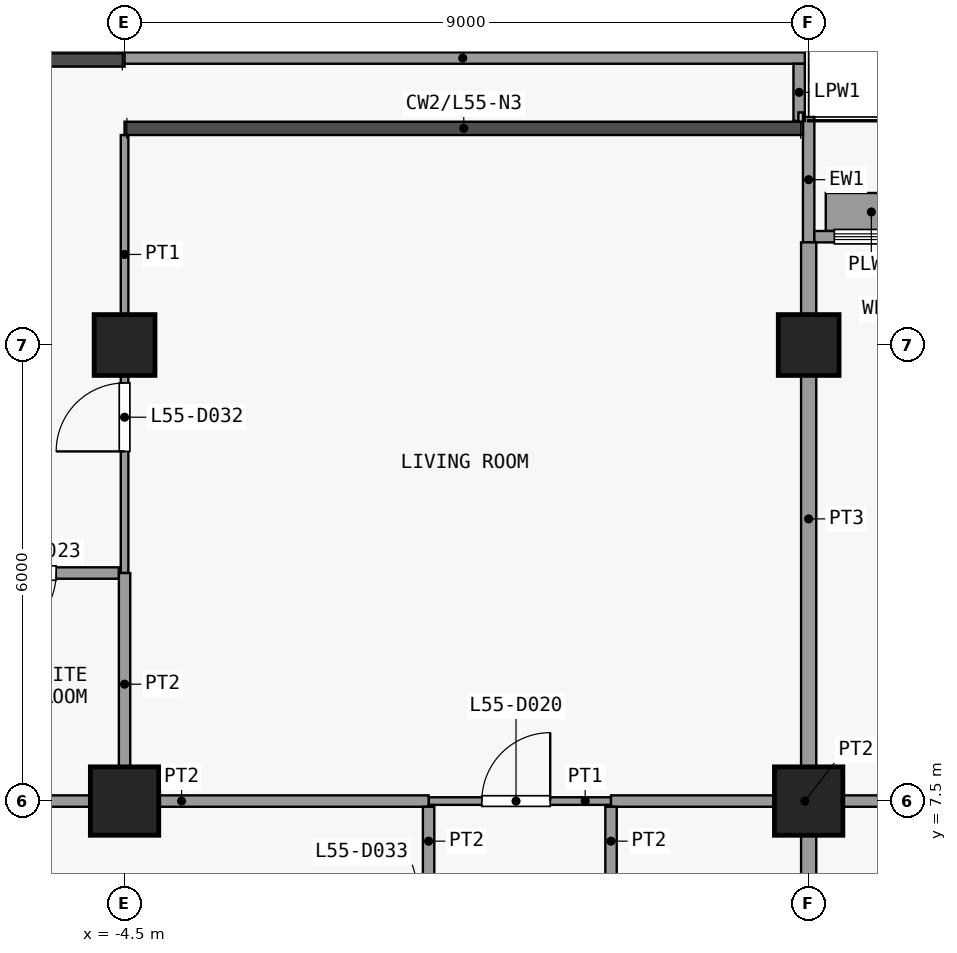
"""IFC4 building model, lengths in metres.
Left out: names, types, materials, properties, quantities, classifications, styles, units other than length and angle.
Written with IfcOpenShell. Run it as: python <this file> out.ifc"""

import sys

from ifc_helpers import new_model, si_unit, direction, frame, frame_2d, origin, origin_2d, place, context, subcontext, project, spatial, rectangle, extrude, element, fill, save


model = new_model("IFC4")
c1 = context("Model", 3, precision=1e-05, world=origin(), true_north=direction((0.0, 1.0)))
c2 = subcontext(c1, "Body", "Model", "MODEL_VIEW")
j1 = project(units=[si_unit("LENGTHUNIT", "METRE"), si_unit("PLANEANGLEUNIT", "RADIAN")], contexts=[c1])
p1 = place(None, origin())
s1 = spatial("IfcSite", under=j1, at=p1, CompositionType="ELEMENT")
p2 = place(p1, origin())
s2 = spatial("IfcBuilding", under=s1, at=p2, CompositionType="ELEMENT")
p3 = place(p2, frame((0.0, 0.0, 219.5)))
s3 = spatial("IfcBuildingStorey", under=s2, at=p3, CompositionType="ELEMENT", Elevation=219.5)
p4 = place(p3, frame((-4.5, 7.5, 0.0), z_axis=(0.0, 0.0, 1.0), x_axis=(1.0, 0.0, 0.0)))
e1 = element("IfcColumn", 1, at=p4, inside=s3, PredefinedType="COLUMN", context=c2, shape_type="SweptSolid", body=[
    extrude(rectangle(XDim=0.9, YDim=0.9, at=origin_2d()), origin(), (0.0, 0.0, 1.0), 3.6),
])
p5 = place(p3, frame((-4.5, 13.5, 0.0), z_axis=(0.0, 0.0, 1.0), x_axis=(1.0, 0.0, 0.0)))
e2 = element("IfcColumn", 2, at=p5, inside=s3, PredefinedType="COLUMN", context=c2, shape_type="SweptSolid", body=[
    extrude(rectangle(XDim=0.8, YDim=0.8, at=origin_2d()), origin(), (0.0, 0.0, 1.0), 3.6),
])
p6 = place(p3, frame((4.5, 7.5, 0.0), z_axis=(0.0, 0.0, 1.0), x_axis=(1.0, 0.0, 0.0)))
e3 = element("IfcColumn", 3, at=p6, inside=s3, PredefinedType="COLUMN", context=c2, shape_type="SweptSolid", body=[
    extrude(rectangle(XDim=0.9, YDim=0.9, at=origin_2d()), origin(), (0.0, 0.0, 1.0), 3.6),
])
p7 = place(p3, frame((4.5, 13.5, 0.0), z_axis=(0.0, 0.0, 1.0), x_axis=(1.0, 0.0, 0.0)))
e4 = element("IfcColumn", 4, at=p7, inside=s3, PredefinedType="COLUMN", context=c2, shape_type="SweptSolid", body=[
    extrude(rectangle(XDim=0.8, YDim=0.8, at=origin_2d()), origin(), (0.0, 0.0, 1.0), 3.6),
])
p8 = place(p3, frame((4.5, 14.85, 0.0), z_axis=(0.0, 0.0, 1.0), x_axis=(0.0, 1.0, 0.0)))
e5 = element("IfcWall", 5, at=p8, inside=s3, PredefinedType="SOLIDWALL", context=c2, shape_type="SweptSolid", body=[
    extrude(rectangle(XDim=1.65, YDim=0.15, at=frame_2d((0.825, 0.0))), origin(), (0.0, 0.0, 1.0), 3.3),
])
p9 = place(p3, frame((4.575, 14.925, 0.0), z_axis=(0.0, 0.0, 1.0), x_axis=(1.0, 0.0, 0.0)))
e6 = element("IfcWall", 6, at=p9, inside=s3, PredefinedType="SOLIDWALL", context=c2, shape_type="SweptSolid", body=[
    extrude(rectangle(XDim=5.85, YDim=0.15, at=frame_2d((2.925, 0.0))), origin(), (0.0, 0.0, 1.0), 3.3),
])
p10 = place(p9, frame((2.325, 0.0, 0.0)))
e7 = element("IfcOpeningElement", 7, at=p10, cuts=e6, PredefinedType="OPENING", context=c2, shape_type="SweptSolid", body=[
    extrude(rectangle(XDim=1.2, YDim=2.4, at=frame_2d((0.6, 1.2))), frame((0.0, 0.085, 0.0), z_axis=(0.0, -1.0, 0.0), x_axis=(1.0, 0.0, 0.0)), (0.0, 0.0, 1.0), 0.17),
])
p11 = place(p9, frame((0.262, 0.0, 0.9)))
e8 = element("IfcOpeningElement", 8, at=p11, cuts=e6, PredefinedType="OPENING", context=c2, shape_type="SweptSolid", body=[
    extrude(rectangle(XDim=1.8, YDim=2.1, at=frame_2d((0.9, 1.05))), frame((0.0, 0.085, 0.0), z_axis=(0.0, -1.0, 0.0), x_axis=(1.0, 0.0, 0.0)), (0.0, 0.0, 1.0), 0.17),
])
p12 = place(p9, frame((3.788, 0.0, 0.9)))
e9 = element("IfcOpeningElement", 9, at=p12, cuts=e6, PredefinedType="OPENING", context=c2, shape_type="SweptSolid", body=[
    extrude(rectangle(XDim=1.8, YDim=2.1, at=frame_2d((0.9, 1.05))), frame((0.0, 0.085, 0.0), z_axis=(0.0, -1.0, 0.0), x_axis=(1.0, 0.0, 0.0)), (0.0, 0.0, 1.0), 0.17),
])
p13 = place(p3, frame((4.725, 15.25, 0.0), z_axis=(0.0, 0.0, 1.0), x_axis=(1.0, 0.0, 0.0)))
e10 = element("IfcWall", 10, at=p13, inside=s3, PredefinedType="USERDEFINED", context=c2, shape_type="SweptSolid", body=[
    extrude(rectangle(XDim=1.2, YDim=0.5, at=frame_2d((0.6, 0.0))), origin(), (0.0, 0.0, 1.0), 0.9),
])
p14 = place(p3, frame((-4.552, 17.275, 0.0), z_axis=(0.0, 0.0, 1.0), x_axis=(1.0, 0.0, 0.0)))
e11 = element("IfcWall", 11, at=p14, inside=s3, PredefinedType="PARAPET", context=c2, shape_type="SweptSolid", body=[
    extrude(rectangle(XDim=9.002, YDim=0.15, at=frame_2d((4.501, 0.0))), origin(), (0.0, 0.0, 1.0), 1.15),
])
p15 = place(p3, frame((4.375, 17.2, 0.0), z_axis=(0.0, 0.0, 1.0), x_axis=(0.0, -1.0, 0.0)))
e12 = element("IfcWall", 12, at=p15, inside=s3, PredefinedType="PARAPET", context=c2, shape_type="SweptSolid", body=[
    extrude(rectangle(XDim=0.752, YDim=0.15, at=frame_2d((0.376, 0.0))), origin(), (0.0, 0.0, 1.0), 1.15),
])
p16 = place(p3, frame((-0.5, 7.5, 0.0), z_axis=(0.0, 0.0, 1.0), x_axis=(1.0, 0.0, 0.0)))
e13 = element("IfcWall", 13, at=p16, inside=s3, PredefinedType="PARTITIONING", context=c2, shape_type="SweptSolid", body=[
    extrude(rectangle(XDim=2.4, YDim=0.1, at=frame_2d((1.2, 0.0))), origin(), (0.0, 0.0, 1.0), 3.3),
])
p17 = place(p16, frame((0.7, 0.0, 0.0)))
e14 = element("IfcOpeningElement", 14, at=p17, cuts=e13, PredefinedType="OPENING", context=c2, shape_type="SweptSolid", body=[
    extrude(rectangle(XDim=0.9, YDim=2.1, at=frame_2d((0.45, 1.05))), frame((0.0, 0.06, 0.0), z_axis=(0.0, -1.0, 0.0), x_axis=(1.0, 0.0, 0.0)), (0.0, 0.0, 1.0), 0.12),
])
p18 = place(p3, frame((-7.0, 7.5, 0.0), z_axis=(0.0, 0.0, 1.0), x_axis=(1.0, 0.0, 0.0)))
e15 = element("IfcWall", 15, at=p18, inside=s3, PredefinedType="PARTITIONING", context=c2, shape_type="SweptSolid", body=[
    extrude(rectangle(XDim=6.5, YDim=0.15, at=frame_2d((3.25, 0.0))), origin(), (0.0, 0.0, 1.0), 3.3),
])
p19 = place(p3, frame((1.9, 7.5, 0.0), z_axis=(0.0, 0.0, 1.0), x_axis=(1.0, 0.0, 0.0)))
e16 = element("IfcWall", 16, at=p19, inside=s3, PredefinedType="PARTITIONING", context=c2, shape_type="SweptSolid", body=[
    extrude(rectangle(XDim=5.1, YDim=0.15, at=frame_2d((2.55, 0.0))), origin(), (0.0, 0.0, 1.0), 3.3),
])
p20 = place(p3, frame((-7.2, 10.5, 0.0), z_axis=(0.0, 0.0, 1.0), x_axis=(1.0, 0.0, 0.0)))
e17 = element("IfcWall", 17, at=p20, inside=s3, PredefinedType="PARTITIONING", context=c2, shape_type="SweptSolid", body=[
    extrude(rectangle(XDim=2.625, YDim=0.15, at=frame_2d((1.312, 0.0))), origin(), (0.0, 0.0, 1.0), 3.3),
])
p21 = place(p20, frame((0.9, 0.0, 0.0)))
e18 = element("IfcOpeningElement", 18, at=p21, cuts=e17, PredefinedType="OPENING", context=c2, shape_type="SweptSolid", body=[
    extrude(rectangle(XDim=0.9, YDim=2.1, at=frame_2d((0.45, 1.05))), frame((0.0, 0.085, 0.0), z_axis=(0.0, -1.0, 0.0), x_axis=(1.0, 0.0, 0.0)), (0.0, 0.0, 1.0), 0.17),
])
p22 = place(p3, frame((-4.5, 10.5, 0.0), z_axis=(0.0, 0.0, 1.0), x_axis=(0.0, 1.0, 0.0)))
e19 = element("IfcWall", 19, at=p22, inside=s3, PredefinedType="PARTITIONING", context=c2, shape_type="SweptSolid", body=[
    extrude(rectangle(XDim=5.762, YDim=0.1, at=frame_2d((2.881, 0.0))), origin(), (0.0, 0.0, 1.0), 3.3),
])
p23 = place(p22, frame((1.6, 0.0, 0.0)))
e20 = element("IfcOpeningElement", 20, at=p23, cuts=e19, PredefinedType="OPENING", context=c2, shape_type="SweptSolid", body=[
    extrude(rectangle(XDim=0.9, YDim=2.1, at=frame_2d((0.45, 1.05))), frame((0.0, 0.06, 0.0), z_axis=(0.0, -1.0, 0.0), x_axis=(1.0, 0.0, 0.0)), (0.0, 0.0, 1.0), 0.12),
])
p24 = place(p3, frame((-4.5, 7.575, 0.0), z_axis=(0.0, 0.0, 1.0), x_axis=(0.0, 1.0, 0.0)))
e21 = element("IfcWall", 21, at=p24, inside=s3, PredefinedType="PARTITIONING", context=c2, shape_type="SweptSolid", body=[
    extrude(rectangle(XDim=2.925, YDim=0.15, at=frame_2d((1.462, 0.0))), origin(), (0.0, 0.0, 1.0), 3.3),
])
p25 = place(p3, frame((-0.5, 4.6, 0.0), z_axis=(0.0, 0.0, 1.0), x_axis=(0.0, 1.0, 0.0)))
e22 = element("IfcWall", 22, at=p25, inside=s3, PredefinedType="PARTITIONING", context=c2, shape_type="SweptSolid", body=[
    extrude(rectangle(XDim=2.825, YDim=0.15, at=frame_2d((1.413, 0.0))), origin(), (0.0, 0.0, 1.0), 3.3),
])
p26 = place(p25, frame((0.9, 0.0, 0.0)))
e23 = element("IfcOpeningElement", 23, at=p26, cuts=e22, PredefinedType="OPENING", context=c2, shape_type="SweptSolid", body=[
    extrude(rectangle(XDim=0.9, YDim=2.1, at=frame_2d((0.45, 1.05))), frame((0.0, 0.085, 0.0), z_axis=(0.0, -1.0, 0.0), x_axis=(1.0, 0.0, 0.0)), (0.0, 0.0, 1.0), 0.17),
])
p27 = place(p3, frame((1.9, 4.6, 0.0), z_axis=(0.0, 0.0, 1.0), x_axis=(0.0, 1.0, 0.0)))
e24 = element("IfcWall", 24, at=p27, inside=s3, PredefinedType="PARTITIONING", context=c2, shape_type="SweptSolid", body=[
    extrude(rectangle(XDim=2.825, YDim=0.15, at=frame_2d((1.413, 0.0))), origin(), (0.0, 0.0, 1.0), 3.3),
])
p28 = place(p27, frame((0.9, 0.0, 0.0)))
e25 = element("IfcOpeningElement", 25, at=p28, cuts=e24, PredefinedType="OPENING", context=c2, shape_type="SweptSolid", body=[
    extrude(rectangle(XDim=0.9, YDim=2.1, at=frame_2d((0.45, 1.05))), frame((0.0, 0.085, 0.0), z_axis=(0.0, -1.0, 0.0), x_axis=(1.0, 0.0, 0.0)), (0.0, 0.0, 1.0), 0.17),
])
p29 = place(p3, frame((4.5, 4.6, 0.0), z_axis=(0.0, 0.0, 1.0), x_axis=(0.0, 1.0, 0.0)))
e26 = element("IfcWall", 26, at=p29, inside=s3, PredefinedType="PARTITIONING", context=c2, shape_type="SweptSolid", body=[
    extrude(rectangle(XDim=2.825, YDim=0.2, at=frame_2d((1.413, 0.0))), origin(), (0.0, 0.0, 1.0), 3.3),
])
p30 = place(p3, frame((4.5, 7.575, 0.0), z_axis=(0.0, 0.0, 1.0), x_axis=(0.0, 1.0, 0.0)))
e27 = element("IfcWall", 27, at=p30, inside=s3, PredefinedType="PARTITIONING", context=c2, shape_type="SweptSolid", body=[
    extrude(rectangle(XDim=7.275, YDim=0.2, at=frame_2d((3.638, 0.0))), origin(), (0.0, 0.0, 1.0), 3.3),
])
p31 = place(p11, origin())
e28 = element("IfcWindow", 28, at=p31, inside=s3, PartitioningType="SINGLE_PANEL", PredefinedType="WINDOW", context=c2, shape_type="SweptSolid", body=[
    extrude(rectangle(XDim=1.8, YDim=2.1, at=frame_2d((0.9, 1.05))), frame((0.0, 0.03, 0.0), z_axis=(0.0, -1.0, 0.0), x_axis=(1.0, 0.0, 0.0)), (0.0, 0.0, 1.0), 0.06),
])
fill(e8, e28)
p32 = place(p17, origin())
e29 = element("IfcDoor", 29, at=p32, inside=s3, OperationType="SINGLE_SWING_LEFT", PredefinedType="DOOR", context=c2, shape_type="SweptSolid", body=[
    extrude(rectangle(XDim=0.9, YDim=2.1, at=frame_2d((0.45, 1.05))), frame((0.0, 0.025, 0.0), z_axis=(0.0, -1.0, 0.0), x_axis=(1.0, 0.0, 0.0)), (0.0, 0.0, 1.0), 0.05),
])
fill(e14, e29)
p33 = place(p21, origin())
e30 = element("IfcDoor", 30, at=p33, inside=s3, OperationType="SINGLE_SWING_LEFT", PredefinedType="DOOR", context=c2, shape_type="SweptSolid", body=[
    extrude(rectangle(XDim=0.9, YDim=2.1, at=frame_2d((0.45, 1.05))), frame((0.0, 0.025, 0.0), z_axis=(0.0, -1.0, 0.0), x_axis=(1.0, 0.0, 0.0)), (0.0, 0.0, 1.0), 0.05),
])
fill(e18, e30)
p34 = place(p23, origin())
e31 = element("IfcDoor", 31, at=p34, inside=s3, OperationType="SINGLE_SWING_RIGHT", PredefinedType="DOOR", context=c2, shape_type="SweptSolid", body=[
    extrude(rectangle(XDim=0.9, YDim=2.1, at=frame_2d((0.45, 1.05))), frame((0.0, 0.025, 0.0), z_axis=(0.0, -1.0, 0.0), x_axis=(1.0, 0.0, 0.0)), (0.0, 0.0, 1.0), 0.05),
])
fill(e20, e31)
save(model, sys.argv[1])
